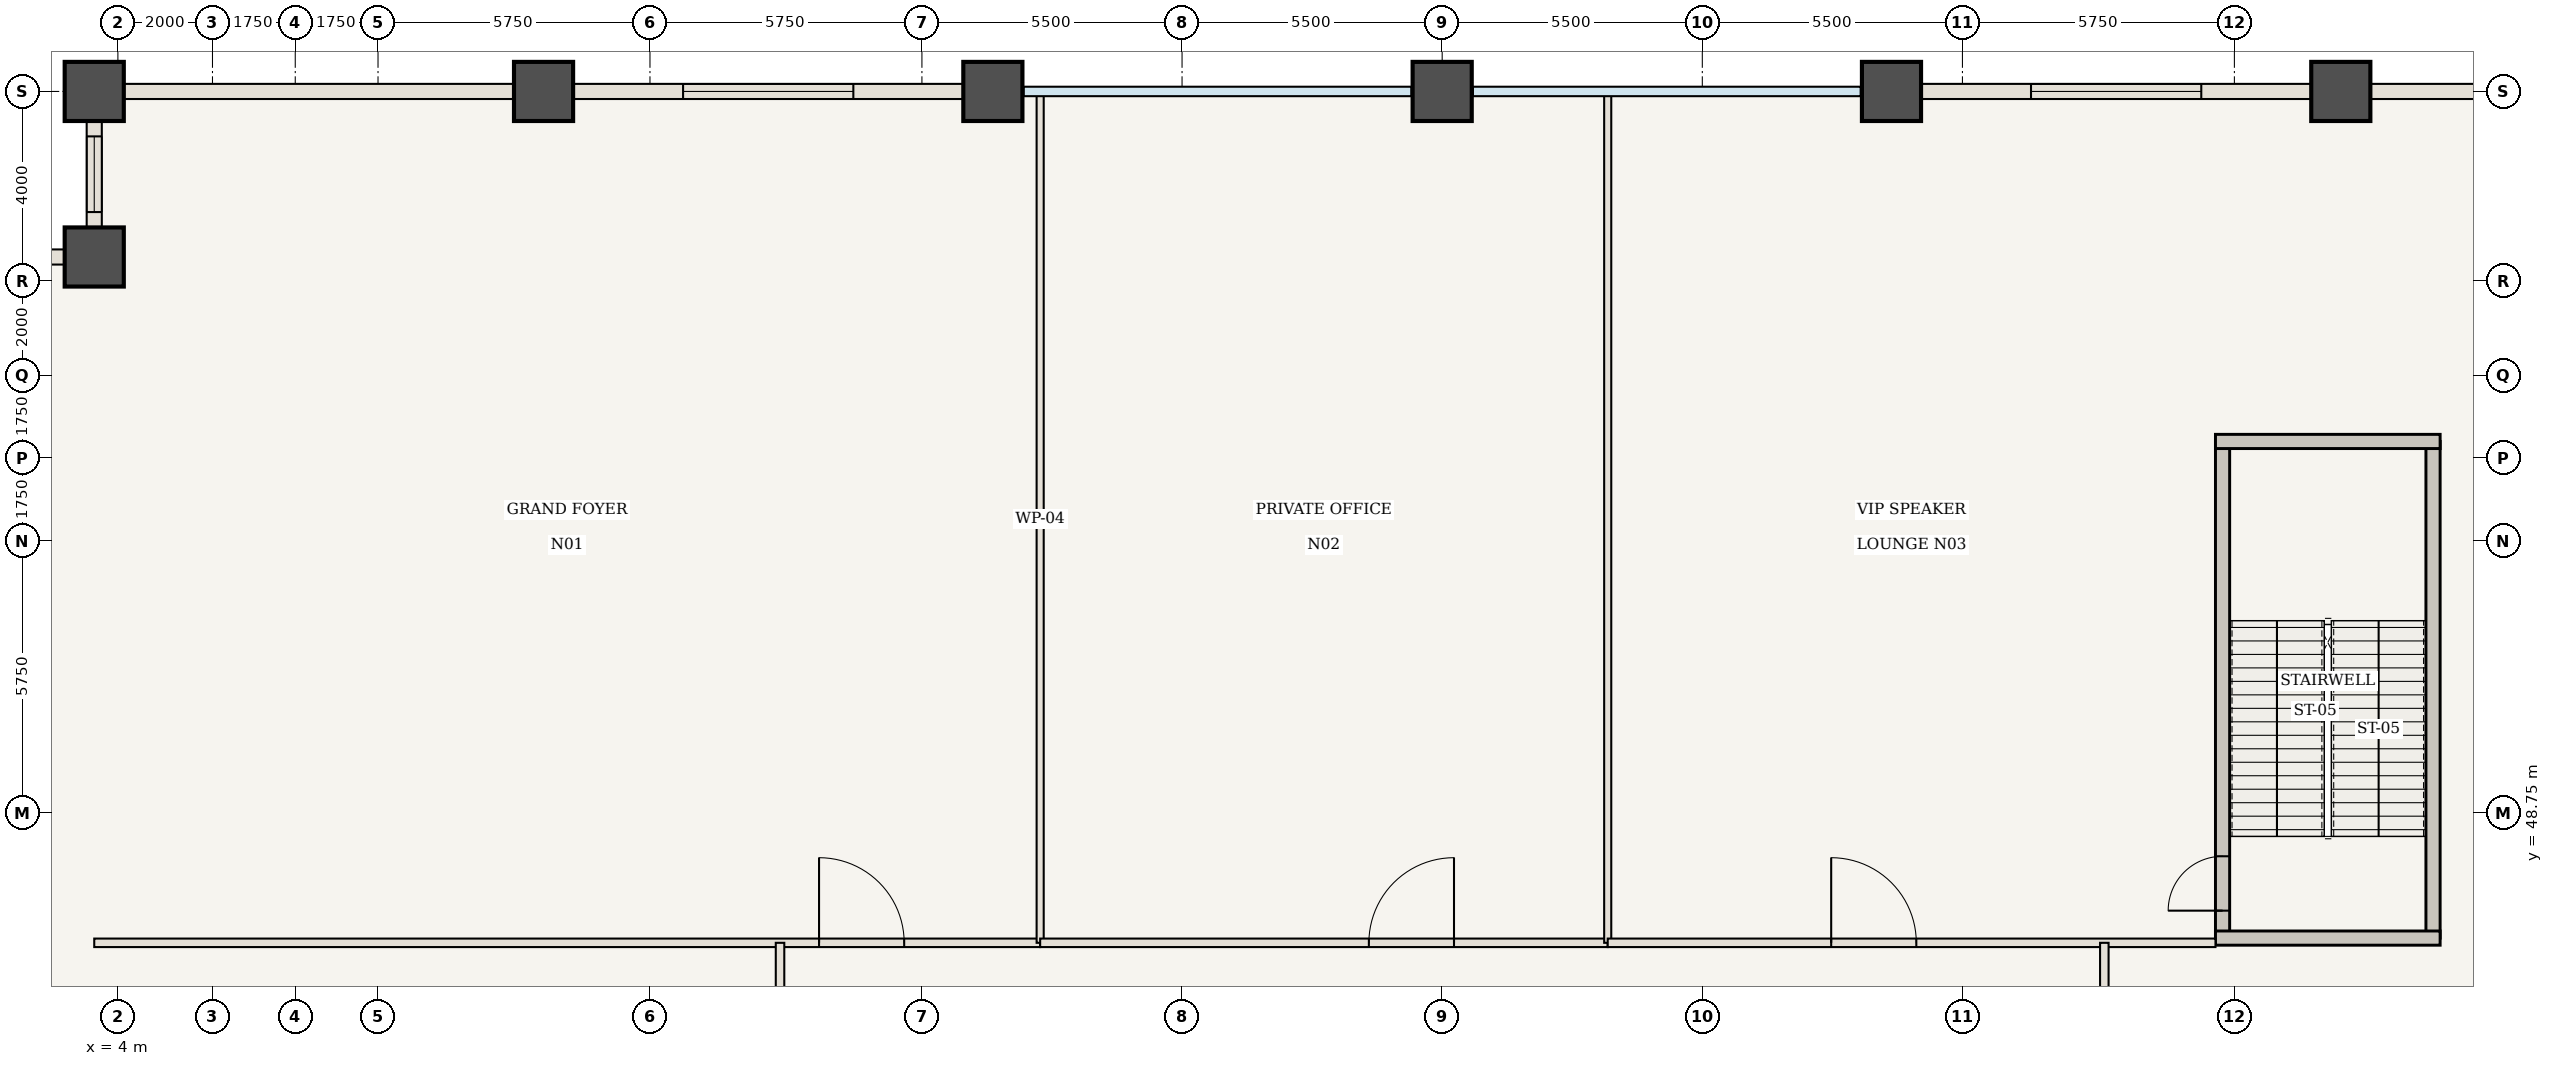
"""IFC4 building model, lengths in metres.
Left out: names, types, materials, properties, quantities, classifications, styles, units other than length and angle.
Written with IfcOpenShell. Run it as: python <this file> out.ifc"""

import sys

from ifc_helpers import new_model, si_unit, direction, frame, frame_2d, origin, origin_2d, place, context, subcontext, project, spatial, rectangle, extrude, element, fill, save


model = new_model("IFC4")
c1 = context("Model", 3, precision=1e-05, world=origin(), true_north=direction((0.0, 1.0)))
c2 = subcontext(c1, "Body", "Model", "MODEL_VIEW")
j1 = project(units=[si_unit("LENGTHUNIT", "METRE"), si_unit("PLANEANGLEUNIT", "RADIAN")], contexts=[c1])
p1 = place(None, origin())
s1 = spatial("IfcSite", under=j1, at=p1, CompositionType="ELEMENT")
p2 = place(p1, origin())
s2 = spatial("IfcBuilding", under=s1, at=p2, CompositionType="ELEMENT")
p3 = place(p2, frame((0.0, 0.0, 17.85)))
s3 = spatial("IfcBuildingStorey", under=s2, at=p3, CompositionType="ELEMENT", Elevation=17.85)
for number, where, z_axis, x_axis in (
    (1, (3.5, 64.0, 0.0), (0.0, 0.0, 1.0), (1.0, 0.0, 0.0)),
    (2, (3.5, 60.5, 0.0), (0.0, 0.0, 1.0), (1.0, 0.0, 0.0)),
    (3, (13.0, 64.0, 0.0), (0.0, 0.0, 1.0), (1.0, 0.0, 0.0)),
    (4, (22.5, 64.0, 0.0), (0.0, 0.0, 1.0), (1.0, 0.0, 0.0)),
    (5, (32.0, 64.0, 0.0), (0.0, 0.0, 1.0), (1.0, 0.0, 0.0)),
    (6, (41.5, 64.0, 0.0), (0.0, 0.0, 1.0), (1.0, 0.0, 0.0)),
    (7, (51.0, 64.0, 0.0), (0.0, 0.0, 1.0), (1.0, 0.0, 0.0)),
):
    element("IfcColumn", number, at=place(p3, frame(where, z_axis=z_axis, x_axis=x_axis)), inside=s3, PredefinedType="COLUMN", context=c2, shape_type="SweptSolid", body=[
        extrude(rectangle(XDim=1.25, YDim=1.25, at=origin_2d()), origin(), (0.0, 0.0, 1.0), 5.95),
    ])
p4 = place(p3, frame((48.5, 46.1, 0.0), z_axis=(0.0, 0.0, 1.0), x_axis=(0.0, 1.0, 0.0)))
e8 = element("IfcWall", 8, at=p4, inside=s3, PredefinedType="SHEAR", context=c2, shape_type="SweptSolid", body=[
    extrude(rectangle(XDim=10.5, YDim=0.3, at=frame_2d((5.25, 0.0))), origin(), (0.0, 0.0, 1.0), 5.71),
])
p5 = place(p4, frame((0.58, 0.0, 0.0)))
e9 = element("IfcOpeningElement", 9, at=p5, cuts=e8, PredefinedType="OPENING", context=c2, shape_type="SweptSolid", body=[
    extrude(rectangle(XDim=1.15, YDim=2.15, at=frame_2d((0.575, 1.075))), frame((0.0, 0.16, 0.0), z_axis=(0.0, -1.0, 0.0), x_axis=(1.0, 0.0, 0.0)), (0.0, 0.0, 1.0), 0.32),
])
p6 = place(p3, frame((52.95, 46.1, 0.0), z_axis=(0.0, 0.0, 1.0), x_axis=(0.0, 1.0, 0.0)))
e10 = element("IfcWall", 10, at=p6, inside=s3, PredefinedType="SHEAR", context=c2, shape_type="SweptSolid", body=[
    extrude(rectangle(XDim=10.5, YDim=0.3, at=frame_2d((5.25, 0.0))), origin(), (0.0, 0.0, 1.0), 5.71),
])
for number, where, z_axis, x_axis in (
    (11, (48.35, 46.1, 0.0), (0.0, 0.0, 1.0), (1.0, 0.0, 0.0)),
    (12, (48.35, 56.6, 0.0), (0.0, 0.0, 1.0), (1.0, 0.0, 0.0)),
):
    element("IfcWall", number, at=place(p3, frame(where, z_axis=z_axis, x_axis=x_axis)), inside=s3, PredefinedType="SHEAR", context=c2, shape_type="SweptSolid", body=[
        extrude(rectangle(XDim=4.75, YDim=0.3, at=frame_2d((2.375, 0.0))), origin(), (0.0, 0.0, 1.0), 5.71),
    ])
p7 = place(p3, frame((3.5, 46.0, 0.0), z_axis=(0.0, 0.0, 1.0), x_axis=(1.0, 0.0, 0.0)))
e13 = element("IfcWall", 13, at=p7, inside=s3, PredefinedType="STANDARD", context=c2, shape_type="SweptSolid", body=[
    extrude(rectangle(XDim=20.0, YDim=0.18, at=frame_2d((10.0, 0.0))), origin(), (0.0, 0.0, 1.0), 5.71),
])
p8 = place(p7, frame((15.325, 0.0, 0.0)))
e14 = element("IfcOpeningElement", 14, at=p8, cuts=e13, PredefinedType="OPENING", context=c2, shape_type="SweptSolid", body=[
    extrude(rectangle(XDim=1.8, YDim=2.35, at=frame_2d((0.9, 1.175))), frame((0.0, 0.1, 0.0), z_axis=(0.0, -1.0, 0.0), x_axis=(1.0, 0.0, 0.0)), (0.0, 0.0, 1.0), 0.2),
])
p9 = place(p3, frame((23.5, 46.0, 0.0), z_axis=(0.0, 0.0, 1.0), x_axis=(0.0, 1.0, 0.0)))
e15 = element("IfcWall", 15, at=p9, inside=s3, PredefinedType="STANDARD", context=c2, shape_type="SweptSolid", body=[
    extrude(rectangle(XDim=17.94, YDim=0.15, at=frame_2d((8.97, 0.0))), origin(), (0.0, 0.0, 1.0), 5.71),
])
p10 = place(p3, frame((23.5, 46.0, 0.0), z_axis=(0.0, 0.0, 1.0), x_axis=(1.0, 0.0, 0.0)))
e16 = element("IfcWall", 16, at=p10, inside=s3, PredefinedType="STANDARD", context=c2, shape_type="SweptSolid", body=[
    extrude(rectangle(XDim=12.0, YDim=0.18, at=frame_2d((6.0, 0.0))), origin(), (0.0, 0.0, 1.0), 5.71),
])
p11 = place(p10, frame((6.95, 0.0, 0.0)))
e17 = element("IfcOpeningElement", 17, at=p11, cuts=e16, PredefinedType="OPENING", context=c2, shape_type="SweptSolid", body=[
    extrude(rectangle(XDim=1.8, YDim=2.35, at=frame_2d((0.9, 1.175))), frame((0.0, 0.1, 0.0), z_axis=(0.0, -1.0, 0.0), x_axis=(1.0, 0.0, 0.0)), (0.0, 0.0, 1.0), 0.2),
])
p12 = place(p3, frame((35.5, 46.0, 0.0), z_axis=(0.0, 0.0, 1.0), x_axis=(0.0, 1.0, 0.0)))
e18 = element("IfcWall", 18, at=p12, inside=s3, PredefinedType="STANDARD", context=c2, shape_type="SweptSolid", body=[
    extrude(rectangle(XDim=17.94, YDim=0.15, at=frame_2d((8.97, 0.0))), origin(), (0.0, 0.0, 1.0), 5.71),
])
p13 = place(p3, frame((35.5, 46.0, 0.0), z_axis=(0.0, 0.0, 1.0), x_axis=(1.0, 0.0, 0.0)))
e19 = element("IfcWall", 19, at=p13, inside=s3, PredefinedType="STANDARD", context=c2, shape_type="SweptSolid", body=[
    extrude(rectangle(XDim=12.85, YDim=0.18, at=frame_2d((6.425, 0.0))), origin(), (0.0, 0.0, 1.0), 5.71),
])
p14 = place(p13, frame((4.725, 0.0, 0.0)))
e20 = element("IfcOpeningElement", 20, at=p14, cuts=e19, PredefinedType="OPENING", context=c2, shape_type="SweptSolid", body=[
    extrude(rectangle(XDim=1.8, YDim=2.35, at=frame_2d((0.9, 1.175))), frame((0.0, 0.1, 0.0), z_axis=(0.0, -1.0, 0.0), x_axis=(1.0, 0.0, 0.0)), (0.0, 0.0, 1.0), 0.2),
])
p15 = place(p3, frame((18.0, 31.2, 0.0), z_axis=(0.0, 0.0, 1.0), x_axis=(0.0, 1.0, 0.0)))
e21 = element("IfcWall", 21, at=p15, inside=s3, PredefinedType="STANDARD", context=c2, shape_type="SweptSolid", body=[
    extrude(rectangle(XDim=14.8, YDim=0.18, at=frame_2d((7.4, 0.0))), origin(), (0.0, 0.0, 1.0), 5.71),
])
p16 = place(p15, frame((6.9, 0.0, 0.0)))
e22 = element("IfcOpeningElement", 22, at=p16, cuts=e21, PredefinedType="OPENING", context=c2, shape_type="SweptSolid", body=[
    extrude(rectangle(XDim=0.95, YDim=2.15, at=frame_2d((0.475, 1.075))), frame((0.0, 0.1, 0.0), z_axis=(0.0, -1.0, 0.0), x_axis=(1.0, 0.0, 0.0)), (0.0, 0.0, 1.0), 0.2),
])
p17 = place(p3, frame((46.0, 32.8, 0.0), z_axis=(0.0, 0.0, 1.0), x_axis=(0.0, 1.0, 0.0)))
e23 = element("IfcWall", 23, at=p17, inside=s3, PredefinedType="STANDARD", context=c2, shape_type="SweptSolid", body=[
    extrude(rectangle(XDim=13.2, YDim=0.18, at=frame_2d((6.6, 0.0))), origin(), (0.0, 0.0, 1.0), 5.71),
])
p18 = place(p17, frame((6.1, 0.0, 0.0)))
e24 = element("IfcOpeningElement", 24, at=p18, cuts=e23, PredefinedType="OPENING", context=c2, shape_type="SweptSolid", body=[
    extrude(rectangle(XDim=0.95, YDim=2.15, at=frame_2d((0.475, 1.075))), frame((0.0, 0.1, 0.0), z_axis=(0.0, -1.0, 0.0), x_axis=(1.0, 0.0, 0.0)), (0.0, 0.0, 1.0), 0.2),
])
p19 = place(p3, frame((3.5, 64.0, 0.0), z_axis=(0.0, 0.0, 1.0), x_axis=(1.0, 0.0, 0.0)))
e25 = element("IfcWall", 25, at=p19, inside=s3, PredefinedType="USERDEFINED", context=c2, shape_type="SweptSolid", body=[
    extrude(rectangle(XDim=9.5, YDim=0.32, at=frame_2d((4.75, 0.0))), origin(), (0.0, 0.0, 1.0), 4.81),
])
p20 = place(p3, frame((13.0, 64.0, 0.0), z_axis=(0.0, 0.0, 1.0), x_axis=(1.0, 0.0, 0.0)))
e26 = element("IfcWall", 26, at=p20, inside=s3, PredefinedType="USERDEFINED", context=c2, shape_type="SweptSolid", body=[
    extrude(rectangle(XDim=9.5, YDim=0.32, at=frame_2d((4.75, 0.0))), origin(), (0.0, 0.0, 1.0), 4.81),
])
p21 = place(p20, frame((2.95, 0.0, 0.85)))
e27 = element("IfcOpeningElement", 27, at=p21, cuts=e26, PredefinedType="OPENING", context=c2, shape_type="SweptSolid", body=[
    extrude(rectangle(XDim=3.6, YDim=2.6, at=frame_2d((1.8, 1.3))), frame((0.0, 0.17, 0.0), z_axis=(0.0, -1.0, 0.0), x_axis=(1.0, 0.0, 0.0)), (0.0, 0.0, 1.0), 0.34),
])
p22 = place(p3, frame((41.5, 64.0, 0.0), z_axis=(0.0, 0.0, 1.0), x_axis=(1.0, 0.0, 0.0)))
e28 = element("IfcWall", 28, at=p22, inside=s3, PredefinedType="USERDEFINED", context=c2, shape_type="SweptSolid", body=[
    extrude(rectangle(XDim=9.5, YDim=0.32, at=frame_2d((4.75, 0.0))), origin(), (0.0, 0.0, 1.0), 4.81),
])
p23 = place(p22, frame((2.95, 0.0, 0.85)))
e29 = element("IfcOpeningElement", 29, at=p23, cuts=e28, PredefinedType="OPENING", context=c2, shape_type="SweptSolid", body=[
    extrude(rectangle(XDim=3.6, YDim=2.6, at=frame_2d((1.8, 1.3))), frame((0.0, 0.17, 0.0), z_axis=(0.0, -1.0, 0.0), x_axis=(1.0, 0.0, 0.0)), (0.0, 0.0, 1.0), 0.34),
])
p24 = place(p3, frame((51.0, 64.0, 0.0), z_axis=(0.0, 0.0, 1.0), x_axis=(1.0, 0.0, 0.0)))
e30 = element("IfcWall", 30, at=p24, inside=s3, PredefinedType="USERDEFINED", context=c2, shape_type="SweptSolid", body=[
    extrude(rectangle(XDim=9.5, YDim=0.32, at=frame_2d((4.75, 0.0))), origin(), (0.0, 0.0, 1.0), 4.81),
])
p25 = place(p3, frame((3.5, 60.5, 0.0), z_axis=(0.0, 0.0, 1.0), x_axis=(0.0, 1.0, 0.0)))
e31 = element("IfcWall", 31, at=p25, inside=s3, PredefinedType="USERDEFINED", context=c2, shape_type="SweptSolid", body=[
    extrude(rectangle(XDim=3.5, YDim=0.32, at=frame_2d((1.75, 0.0))), origin(), (0.0, 0.0, 1.0), 4.81),
])
p26 = place(p25, frame((0.95, 0.0, 0.85)))
e32 = element("IfcOpeningElement", 32, at=p26, cuts=e31, PredefinedType="OPENING", context=c2, shape_type="SweptSolid", body=[
    extrude(rectangle(XDim=1.6, YDim=2.05, at=frame_2d((0.8, 1.025))), frame((0.0, 0.17, 0.0), z_axis=(0.0, -1.0, 0.0), x_axis=(1.0, 0.0, 0.0)), (0.0, 0.0, 1.0), 0.34),
])
p27 = place(p3, frame((0.0, 60.5, 0.0), z_axis=(0.0, 0.0, 1.0), x_axis=(1.0, 0.0, 0.0)))
e33 = element("IfcWall", 33, at=p27, inside=s3, PredefinedType="USERDEFINED", context=c2, shape_type="SweptSolid", body=[
    extrude(rectangle(XDim=3.5, YDim=0.32, at=frame_2d((1.75, 0.0))), origin(), (0.0, 0.0, 1.0), 4.81),
])
p28 = place(p27, frame((0.95, 0.0, 0.85)))
e34 = element("IfcOpeningElement", 34, at=p28, cuts=e33, PredefinedType="OPENING", context=c2, shape_type="SweptSolid", body=[
    extrude(rectangle(XDim=1.6, YDim=2.05, at=frame_2d((0.8, 1.025))), frame((0.0, 0.17, 0.0), z_axis=(0.0, -1.0, 0.0), x_axis=(1.0, 0.0, 0.0)), (0.0, 0.0, 1.0), 0.34),
])
p29 = place(p5, origin())
e35 = element("IfcDoor", 35, at=p29, inside=s3, OperationType="SINGLE_SWING_LEFT", PredefinedType="DOOR", context=c2, shape_type="SweptSolid", body=[
    extrude(rectangle(XDim=1.15, YDim=2.15, at=frame_2d((0.575, 1.075))), frame((0.0, 0.025, 0.0), z_axis=(0.0, -1.0, 0.0), x_axis=(1.0, 0.0, 0.0)), (0.0, 0.0, 1.0), 0.05),
])
fill(e9, e35)
p30 = place(p8, origin())
e36 = element("IfcDoor", 36, at=p30, inside=s3, OperationType="SINGLE_SWING_LEFT", PredefinedType="DOOR", context=c2, shape_type="SweptSolid", body=[
    extrude(rectangle(XDim=1.8, YDim=2.35, at=frame_2d((0.9, 1.175))), frame((0.0, 0.025, 0.0), z_axis=(0.0, -1.0, 0.0), x_axis=(1.0, 0.0, 0.0)), (0.0, 0.0, 1.0), 0.05),
])
fill(e14, e36)
p31 = place(p11, origin())
e37 = element("IfcDoor", 37, at=p31, inside=s3, OperationType="SINGLE_SWING_RIGHT", PredefinedType="DOOR", context=c2, shape_type="SweptSolid", body=[
    extrude(rectangle(XDim=1.8, YDim=2.35, at=frame_2d((0.9, 1.175))), frame((0.0, 0.025, 0.0), z_axis=(0.0, -1.0, 0.0), x_axis=(1.0, 0.0, 0.0)), (0.0, 0.0, 1.0), 0.05),
])
fill(e17, e37)
p32 = place(p14, origin())
e38 = element("IfcDoor", 38, at=p32, inside=s3, OperationType="SINGLE_SWING_LEFT", PredefinedType="DOOR", context=c2, shape_type="SweptSolid", body=[
    extrude(rectangle(XDim=1.8, YDim=2.35, at=frame_2d((0.9, 1.175))), frame((0.0, 0.025, 0.0), z_axis=(0.0, -1.0, 0.0), x_axis=(1.0, 0.0, 0.0)), (0.0, 0.0, 1.0), 0.05),
])
fill(e20, e38)
p33 = place(p21, origin())
e39 = element("IfcWindow", 39, at=p33, inside=s3, PartitioningType="SINGLE_PANEL", PredefinedType="WINDOW", context=c2, shape_type="SweptSolid", body=[
    extrude(rectangle(XDim=3.6, YDim=2.6, at=frame_2d((1.8, 1.3))), frame((0.0, 0.03, 0.0), z_axis=(0.0, -1.0, 0.0), x_axis=(1.0, 0.0, 0.0)), (0.0, 0.0, 1.0), 0.06),
])
fill(e27, e39)
p34 = place(p23, origin())
e40 = element("IfcWindow", 40, at=p34, inside=s3, PartitioningType="SINGLE_PANEL", PredefinedType="WINDOW", context=c2, shape_type="SweptSolid", body=[
    extrude(rectangle(XDim=3.6, YDim=2.6, at=frame_2d((1.8, 1.3))), frame((0.0, 0.03, 0.0), z_axis=(0.0, -1.0, 0.0), x_axis=(1.0, 0.0, 0.0)), (0.0, 0.0, 1.0), 0.06),
])
fill(e29, e40)
p35 = place(p26, origin())
e41 = element("IfcWindow", 41, at=p35, inside=s3, PartitioningType="SINGLE_PANEL", PredefinedType="WINDOW", context=c2, shape_type="SweptSolid", body=[
    extrude(rectangle(XDim=1.6, YDim=2.05, at=frame_2d((0.8, 1.025))), frame((0.0, 0.03, 0.0), z_axis=(0.0, -1.0, 0.0), x_axis=(1.0, 0.0, 0.0)), (0.0, 0.0, 1.0), 0.06),
])
fill(e32, e41)
save(model, sys.argv[1])
